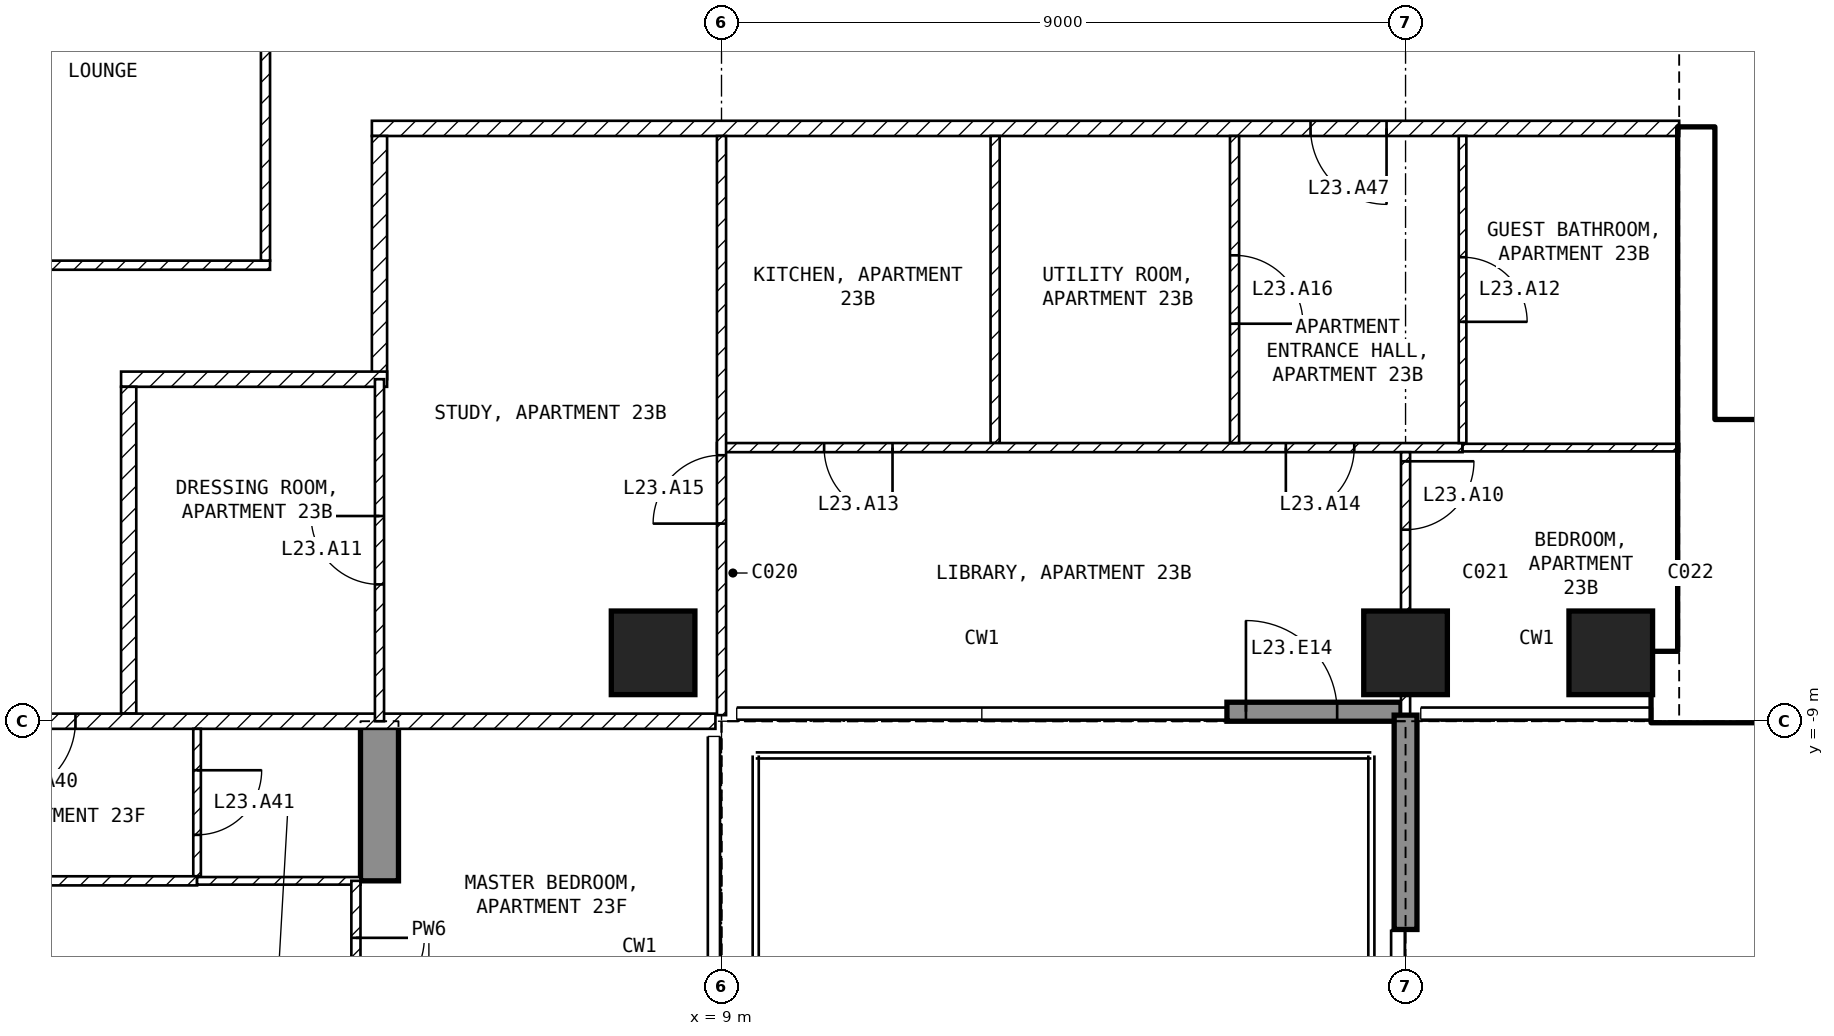
"""IFC4 building model, lengths in metres.
Left out: names, types, materials, properties, quantities, classifications, styles, units other than length and angle.
Written with IfcOpenShell. Run it as: python <this file> out.ifc"""

import sys

from ifc_helpers import new_model, si_unit, direction, frame, frame_2d, origin, origin_2d, place, context, subcontext, project, spatial, polyline, rectangle, outline, extrude, element, fill, save


model = new_model("IFC4")
c1 = context("Model", 3, precision=1e-05, world=origin(), true_north=direction((0.0, 1.0)))
c2 = subcontext(c1, "Body", "Model", "MODEL_VIEW")
j1 = project(units=[si_unit("LENGTHUNIT", "METRE"), si_unit("PLANEANGLEUNIT", "RADIAN")], contexts=[c1])
p1 = place(None, origin())
s1 = spatial("IfcSite", under=j1, at=p1, CompositionType="ELEMENT")
p2 = place(p1, origin())
s2 = spatial("IfcBuilding", under=s1, at=p2, CompositionType="ELEMENT")
p3 = place(p2, frame((0.0, 0.0, 102.4)))
s3 = spatial("IfcBuildingStorey", under=s2, at=p3, CompositionType="ELEMENT", Elevation=102.4)
for number, where, z_axis, x_axis in (
    (1, (8.1, -8.1, -0.25), (0.0, 0.0, 1.0), (1.0, 0.0, 0.0)),
    (2, (18.0, -8.1, -0.25), (0.0, 0.0, 1.0), (1.0, 0.0, 0.0)),
    (3, (20.7, -8.1, -0.25), (0.0, 0.0, 1.0), (1.0, 0.0, 0.0)),
):
    element("IfcColumn", number, at=place(p3, frame(where, z_axis=z_axis, x_axis=x_axis)), inside=s3, PredefinedType="COLUMN", context=c2, shape_type="SweptSolid", body=[
        extrude(rectangle(XDim=1.1, YDim=1.1, at=origin_2d()), origin(), (0.0, 0.0, 1.0), 3.5),
    ])
p4 = place(p3, frame((4.25, -20.15, -0.25), z_axis=(1.0, 0.0, 0.0), x_axis=(0.0, 1.0, 0.0)))
e4 = element("IfcWall", 4, at=p4, inside=s3, PredefinedType="SHEAR", context=c2, shape_type="SweptSolid", body=[
    extrude(outline(polyline([(0.0, 0.0), (6.65, 0.0), (6.65, 2.65), (9.05, 2.65), (9.05, 0.0), (11.15, 0.0), (11.15, 3.5), (0.0, 3.5), (0.0, 0.0)])), origin(), (0.0, 0.0, 1.0), 0.5),
])
p5 = place(p3, frame((15.65, -8.875, 0.0), z_axis=(0.0, 0.0, 1.0), x_axis=(1.0, 0.0, 0.0)))
e5 = element("IfcWall", 5, at=p5, inside=s3, PredefinedType="SOLIDWALL", context=c2, shape_type="SweptSolid", body=[
    extrude(rectangle(XDim=2.29, YDim=0.25, at=frame_2d((1.145, 0.0))), origin(), (0.0, 0.0, 1.0), 3.25),
])
p6 = place(p5, frame((0.25, 0.0, 0.0)))
e6 = element("IfcOpeningElement", 6, at=p6, cuts=e5, PredefinedType="OPENING", context=c2, shape_type="SweptSolid", body=[
    extrude(rectangle(XDim=1.2, YDim=2.4, at=frame_2d((0.6, 1.2))), frame((0.0, 0.135, 0.0), z_axis=(0.0, -1.0, 0.0), x_axis=(1.0, 0.0, 0.0)), (0.0, 0.0, 1.0), 0.27),
])
p7 = place(p3, frame((18.0, -8.92, 0.0), z_axis=(0.0, 0.0, 1.0), x_axis=(0.0, -1.0, 0.0)))
e7 = element("IfcWall", 7, at=p7, inside=s3, PredefinedType="SOLIDWALL", context=c2, shape_type="SweptSolid", body=[
    extrude(rectangle(XDim=2.82, YDim=0.3, at=frame_2d((1.41, 0.0))), origin(), (0.0, 0.0, 1.0), 3.25),
])
p8 = place(p3, frame((21.25, -8.55, 0.0), z_axis=(0.0, 0.0, 1.0), x_axis=(1.0, 0.0, 0.0)))
e8 = element("IfcWall", 8, at=p8, inside=s3, PredefinedType="SHEAR", context=c2, shape_type="SweptSolid", body=[
    extrude(rectangle(XDim=8.95, YDim=0.9, at=frame_2d((4.475, 0.0))), origin(), (0.0, 0.0, 1.0), 3.25),
])
p9 = place(p3, frame((21.825, -8.1, 0.0), z_axis=(0.0, 0.0, 1.0), x_axis=(0.0, 1.0, 0.0)))
e9 = element("IfcWall", 9, at=p9, inside=s3, PredefinedType="SHEAR", context=c2, shape_type="SweptSolid", body=[
    extrude(rectangle(XDim=6.9, YDim=0.45, at=frame_2d((3.45, 0.0))), origin(), (0.0, 0.0, 1.0), 3.25),
])
p10 = place(p3, frame((22.05, -5.15, 0.0), z_axis=(0.0, 0.0, 1.0), x_axis=(1.0, 0.0, 0.0)))
e10 = element("IfcWall", 10, at=p10, inside=s3, PredefinedType="SOLIDWALL", context=c2, shape_type="SweptSolid", body=[
    extrude(rectangle(XDim=6.3, YDim=0.2, at=frame_2d((3.15, 0.0))), origin(), (0.0, 0.0, 1.0), 3.25),
])
p11 = place(p10, frame((0.2, 0.0, 0.0)))
e11 = element("IfcOpeningElement", 11, at=p11, cuts=e10, PredefinedType="OPENING", context=c2, shape_type="SweptSolid", body=[
    extrude(rectangle(XDim=1.0, YDim=2.1, at=frame_2d((0.5, 1.05))), frame((0.0, 0.11, 0.0), z_axis=(0.0, -1.0, 0.0), x_axis=(1.0, 0.0, 0.0)), (0.0, 0.0, 1.0), 0.22),
])
p12 = place(p3, frame((-3.06, -3.0, 0.0), z_axis=(0.0, 0.0, 1.0), x_axis=(1.0, 0.0, 0.0)))
e12 = element("IfcWall", 12, at=p12, inside=s3, PredefinedType="PARTITIONING", context=c2, shape_type="SweptSolid", body=[
    extrude(rectangle(XDim=6.12, YDim=0.12, at=frame_2d((3.06, 0.0))), origin(), (0.0, 0.0, 1.0), 3.25),
])
p13 = place(p3, frame((3.0, -2.94, 0.0), z_axis=(0.0, 0.0, 1.0), x_axis=(0.0, 1.0, 0.0)))
e13 = element("IfcWall", 13, at=p13, inside=s3, PredefinedType="PARTITIONING", context=c2, shape_type="SweptSolid", body=[
    extrude(rectangle(XDim=5.88, YDim=0.12, at=frame_2d((2.94, 0.0))), origin(), (0.0, 0.0, 1.0), 3.25),
])
p14 = place(p3, frame((21.6, -1.2, 0.0), z_axis=(0.0, 0.0, 1.0), x_axis=(-1.0, 0.0, 0.0)))
e14 = element("IfcWall", 14, at=p14, inside=s3, PredefinedType="PARTITIONING", context=c2, shape_type="SweptSolid", body=[
    extrude(rectangle(XDim=17.2, YDim=0.2, at=frame_2d((8.6, 0.0))), origin(), (0.0, 0.0, 1.0), 3.25),
])
p15 = place(p14, frame((3.85, 0.0, 0.0)))
e15 = element("IfcOpeningElement", 15, at=p15, cuts=e14, PredefinedType="OPENING", context=c2, shape_type="SweptSolid", body=[
    extrude(rectangle(XDim=1.0, YDim=2.1, at=frame_2d((0.5, 1.05))), frame((0.0, 0.11, 0.0), z_axis=(0.0, -1.0, 0.0), x_axis=(1.0, 0.0, 0.0)), (0.0, 0.0, 1.0), 0.22),
])
p16 = place(p3, frame((4.5, -1.3, 0.0), z_axis=(0.0, 0.0, 1.0), x_axis=(0.0, -1.0, 0.0)))
e16 = element("IfcWall", 16, at=p16, inside=s3, PredefinedType="PARTITIONING", context=c2, shape_type="SweptSolid", body=[
    extrude(rectangle(XDim=3.2, YDim=0.2, at=frame_2d((1.6, 0.0))), origin(), (0.0, 0.0, 1.0), 3.25),
])
p17 = place(p3, frame((4.6, -4.5, 0.0), z_axis=(0.0, 0.0, 1.0), x_axis=(-1.0, 0.0, 0.0)))
e17 = element("IfcWall", 17, at=p17, inside=s3, PredefinedType="PARTITIONING", context=c2, shape_type="SweptSolid", body=[
    extrude(rectangle(XDim=3.5, YDim=0.2, at=frame_2d((1.75, 0.0))), origin(), (0.0, 0.0, 1.0), 3.25),
])
p18 = place(p3, frame((1.2, -4.6, 0.0), z_axis=(0.0, 0.0, 1.0), x_axis=(0.0, -1.0, 0.0)))
e18 = element("IfcWall", 18, at=p18, inside=s3, PredefinedType="PARTITIONING", context=c2, shape_type="SweptSolid", body=[
    extrude(rectangle(XDim=4.3, YDim=0.2, at=frame_2d((2.15, 0.0))), origin(), (0.0, 0.0, 1.0), 3.25),
])
p19 = place(p3, frame((8.92, -9.0, 0.0), z_axis=(0.0, 0.0, 1.0), x_axis=(-1.0, 0.0, 0.0)))
e19 = element("IfcWall", 19, at=p19, inside=s3, PredefinedType="PARTITIONING", context=c2, shape_type="SweptSolid", body=[
    extrude(rectangle(XDim=17.84, YDim=0.2, at=frame_2d((8.92, 0.0))), origin(), (0.0, 0.0, 1.0), 3.25),
])
p20 = place(p19, frame((8.42, 0.0, 0.0)))
e20 = element("IfcOpeningElement", 20, at=p20, cuts=e19, PredefinedType="OPENING", context=c2, shape_type="SweptSolid", body=[
    extrude(rectangle(XDim=1.0, YDim=2.1, at=frame_2d((0.5, 1.05))), frame((0.0, 0.11, 0.0), z_axis=(0.0, -1.0, 0.0), x_axis=(1.0, 0.0, 0.0)), (0.0, 0.0, 1.0), 0.22),
])
p21 = place(p3, frame((12.6, -1.3, 0.0), z_axis=(0.0, 0.0, 1.0), x_axis=(0.0, -1.0, 0.0)))
e21 = element("IfcWall", 21, at=p21, inside=s3, PredefinedType="PARTITIONING", context=c2, shape_type="SweptSolid", body=[
    extrude(rectangle(XDim=4.04, YDim=0.12, at=frame_2d((2.02, 0.0))), origin(), (0.0, 0.0, 1.0), 3.25),
])
p22 = place(p3, frame((18.75, -5.4, 0.0), z_axis=(0.0, 0.0, 1.0), x_axis=(-1.0, 0.0, 0.0)))
e22 = element("IfcWall", 22, at=p22, inside=s3, PredefinedType="PARTITIONING", context=c2, shape_type="SweptSolid", body=[
    extrude(rectangle(XDim=9.81, YDim=0.12, at=frame_2d((4.905, 0.0))), origin(), (0.0, 0.0, 1.0), 3.25),
])
p23 = place(p22, frame((7.5, 0.0, 0.0)))
e23 = element("IfcOpeningElement", 23, at=p23, cuts=e22, PredefinedType="OPENING", context=c2, shape_type="SweptSolid", body=[
    extrude(rectangle(XDim=0.9, YDim=2.1, at=frame_2d((0.45, 1.05))), frame((0.0, 0.07, 0.0), z_axis=(0.0, -1.0, 0.0), x_axis=(1.0, 0.0, 0.0)), (0.0, 0.0, 1.0), 0.14),
])
p24 = place(p22, frame((1.425, 0.0, 0.0)))
e24 = element("IfcOpeningElement", 24, at=p24, cuts=e22, PredefinedType="OPENING", context=c2, shape_type="SweptSolid", body=[
    extrude(rectangle(XDim=0.9, YDim=2.1, at=frame_2d((0.45, 1.05))), frame((0.0, 0.07, 0.0), z_axis=(0.0, -1.0, 0.0), x_axis=(1.0, 0.0, 0.0)), (0.0, 0.0, 1.0), 0.14),
])
p25 = place(p3, frame((9.0, -8.92, 0.0), z_axis=(0.0, 0.0, 1.0), x_axis=(0.0, 1.0, 0.0)))
e25 = element("IfcWall", 25, at=p25, inside=s3, PredefinedType="PARTITIONING", context=c2, shape_type="SweptSolid", body=[
    extrude(rectangle(XDim=7.62, YDim=0.12, at=frame_2d((3.81, 0.0))), origin(), (0.0, 0.0, 1.0), 3.25),
])
p26 = place(p25, frame((2.52, 0.0, 0.0)))
e26 = element("IfcOpeningElement", 26, at=p26, cuts=e25, PredefinedType="OPENING", context=c2, shape_type="SweptSolid", body=[
    extrude(rectangle(XDim=0.9, YDim=2.1, at=frame_2d((0.45, 1.05))), frame((0.0, 0.07, 0.0), z_axis=(0.0, -1.0, 0.0), x_axis=(1.0, 0.0, 0.0)), (0.0, 0.0, 1.0), 0.14),
])
p27 = place(p3, frame((15.75, -1.3, 0.0), z_axis=(0.0, 0.0, 1.0), x_axis=(0.0, -1.0, 0.0)))
e27 = element("IfcWall", 27, at=p27, inside=s3, PredefinedType="PARTITIONING", context=c2, shape_type="SweptSolid", body=[
    extrude(rectangle(XDim=4.04, YDim=0.12, at=frame_2d((2.02, 0.0))), origin(), (0.0, 0.0, 1.0), 3.25),
])
p28 = place(p27, frame((1.57, 0.0, 0.0)))
e28 = element("IfcOpeningElement", 28, at=p28, cuts=e27, PredefinedType="OPENING", context=c2, shape_type="SweptSolid", body=[
    extrude(rectangle(XDim=0.9, YDim=2.1, at=frame_2d((0.45, 1.05))), frame((0.0, 0.07, 0.0), z_axis=(0.0, -1.0, 0.0), x_axis=(1.0, 0.0, 0.0)), (0.0, 0.0, 1.0), 0.14),
])
p29 = place(p3, frame((18.75, -1.3, 0.0), z_axis=(0.0, 0.0, 1.0), x_axis=(0.0, -1.0, 0.0)))
e29 = element("IfcWall", 29, at=p29, inside=s3, PredefinedType="PARTITIONING", context=c2, shape_type="SweptSolid", body=[
    extrude(rectangle(XDim=4.04, YDim=0.1, at=frame_2d((2.02, 0.0))), origin(), (0.0, 0.0, 1.0), 3.25),
])
p30 = place(p29, frame((1.595, 0.0, 0.0)))
e30 = element("IfcOpeningElement", 30, at=p30, cuts=e29, PredefinedType="OPENING", context=c2, shape_type="SweptSolid", body=[
    extrude(rectangle(XDim=0.85, YDim=2.1, at=frame_2d((0.425, 1.05))), frame((0.0, 0.06, 0.0), z_axis=(0.0, -1.0, 0.0), x_axis=(1.0, 0.0, 0.0)), (0.0, 0.0, 1.0), 0.12),
])
p31 = place(p3, frame((21.6, -5.4, 0.0), z_axis=(0.0, 0.0, 1.0), x_axis=(-1.0, 0.0, 0.0)))
e31 = element("IfcWall", 31, at=p31, inside=s3, PredefinedType="PARTITIONING", context=c2, shape_type="SweptSolid", body=[
    extrude(rectangle(XDim=2.85, YDim=0.1, at=frame_2d((1.425, 0.0))), origin(), (0.0, 0.0, 1.0), 3.25),
])
p32 = place(p3, frame((18.0, -5.46, 0.0), z_axis=(0.0, 0.0, 1.0), x_axis=(0.0, -1.0, 0.0)))
e32 = element("IfcWall", 32, at=p32, inside=s3, PredefinedType="PARTITIONING", context=c2, shape_type="SweptSolid", body=[
    extrude(rectangle(XDim=3.46, YDim=0.12, at=frame_2d((1.73, 0.0))), origin(), (0.0, 0.0, 1.0), 2.414),
])
p33 = place(p32, frame((0.12, 0.0, 0.0)))
e33 = element("IfcOpeningElement", 33, at=p33, cuts=e32, PredefinedType="OPENING", context=c2, shape_type="SweptSolid", body=[
    extrude(rectangle(XDim=0.9, YDim=2.1, at=frame_2d((0.45, 1.05))), frame((0.0, 0.07, 0.0), z_axis=(0.0, -1.0, 0.0), x_axis=(1.0, 0.0, 0.0)), (0.0, 0.0, 1.0), 0.14),
])
p34 = place(p3, frame((4.5, -9.0, 0.0), z_axis=(0.0, 0.0, 1.0), x_axis=(0.0, 1.0, 0.0)))
e34 = element("IfcWall", 34, at=p34, inside=s3, PredefinedType="PARTITIONING", context=c2, shape_type="SweptSolid", body=[
    extrude(rectangle(XDim=4.5, YDim=0.12, at=frame_2d((2.25, 0.0))), origin(), (0.0, 0.0, 1.0), 3.25),
])
p35 = place(p34, frame((1.8, 0.0, 0.0)))
e35 = element("IfcOpeningElement", 35, at=p35, cuts=e34, PredefinedType="OPENING", context=c2, shape_type="SweptSolid", body=[
    extrude(rectangle(XDim=0.9, YDim=2.1, at=frame_2d((0.45, 1.05))), frame((0.0, 0.07, 0.0), z_axis=(0.0, -1.0, 0.0), x_axis=(1.0, 0.0, 0.0)), (0.0, 0.0, 1.0), 0.14),
])
p36 = place(p3, frame((2.1, -9.1, 0.0), z_axis=(0.0, 0.0, 1.0), x_axis=(0.0, -1.0, 0.0)))
e36 = element("IfcWall", 36, at=p36, inside=s3, PredefinedType="PARTITIONING", context=c2, shape_type="SweptSolid", body=[
    extrude(rectangle(XDim=1.94, YDim=0.1, at=frame_2d((0.97, 0.0))), origin(), (0.0, 0.0, 1.0), 3.25),
])
p37 = place(p36, frame((0.545, 0.0, 0.0)))
e37 = element("IfcOpeningElement", 37, at=p37, cuts=e36, PredefinedType="OPENING", context=c2, shape_type="SweptSolid", body=[
    extrude(rectangle(XDim=0.85, YDim=2.1, at=frame_2d((0.425, 1.05))), frame((0.0, 0.06, 0.0), z_axis=(0.0, -1.0, 0.0), x_axis=(1.0, 0.0, 0.0)), (0.0, 0.0, 1.0), 0.12),
])
p38 = place(p3, frame((2.1, -11.1, 0.0), z_axis=(0.0, 0.0, 1.0), x_axis=(-1.0, 0.0, 0.0)))
e38 = element("IfcWall", 38, at=p38, inside=s3, PredefinedType="PARTITIONING", context=c2, shape_type="SweptSolid", body=[
    extrude(rectangle(XDim=6.35, YDim=0.12, at=frame_2d((3.175, 0.0))), origin(), (0.0, 0.0, 1.0), 3.25),
])
p39 = place(p38, frame((2.725, 0.0, 0.0)))
e39 = element("IfcOpeningElement", 39, at=p39, cuts=e38, PredefinedType="OPENING", context=c2, shape_type="SweptSolid", body=[
    extrude(rectangle(XDim=0.9, YDim=2.1, at=frame_2d((0.45, 1.05))), frame((0.0, 0.07, 0.0), z_axis=(0.0, -1.0, 0.0), x_axis=(1.0, 0.0, 0.0)), (0.0, 0.0, 1.0), 0.14),
])
p40 = place(p3, frame((4.25, -11.1, 0.0), z_axis=(0.0, 0.0, 1.0), x_axis=(-1.0, 0.0, 0.0)))
e40 = element("IfcWall", 40, at=p40, inside=s3, PredefinedType="PARTITIONING", context=c2, shape_type="SweptSolid", body=[
    extrude(rectangle(XDim=2.15, YDim=0.1, at=frame_2d((1.075, 0.0))), origin(), (0.0, 0.0, 1.0), 3.25),
])
p41 = place(p3, frame((4.19, -11.1, 0.0), z_axis=(0.0, 0.0, 1.0), x_axis=(0.0, -1.0, 0.0)))
e41 = element("IfcWall", 41, at=p41, inside=s3, PredefinedType="PARTITIONING", context=c2, shape_type="SweptSolid", body=[
    extrude(rectangle(XDim=2.4, YDim=0.12, at=frame_2d((1.2, 0.0))), origin(), (0.0, 0.0, 1.0), 2.4),
])
p42 = place(p41, frame((0.75, 0.0, 0.0)))
e42 = element("IfcOpeningElement", 42, at=p42, cuts=e41, PredefinedType="OPENING", context=c2, shape_type="SweptSolid", body=[
    extrude(rectangle(XDim=0.9, YDim=2.1, at=frame_2d((0.45, 1.05))), frame((0.0, 0.07, 0.0), z_axis=(0.0, -1.0, 0.0), x_axis=(1.0, 0.0, 0.0)), (0.0, 0.0, 1.0), 0.14),
])
p43 = place(p6, origin())
e43 = element("IfcDoor", 43, at=p43, inside=s3, OperationType="SINGLE_SWING_LEFT", PredefinedType="DOOR", context=c2, shape_type="SweptSolid", body=[
    extrude(rectangle(XDim=1.2, YDim=2.4, at=frame_2d((0.6, 1.2))), frame((0.0, 0.025, 0.0), z_axis=(0.0, -1.0, 0.0), x_axis=(1.0, 0.0, 0.0)), (0.0, 0.0, 1.0), 0.05),
])
fill(e6, e43)
p44 = place(p11, origin())
e44 = element("IfcDoor", 44, at=p44, inside=s3, OperationType="SINGLE_SWING_LEFT", PredefinedType="DOOR", context=c2, shape_type="SweptSolid", body=[
    extrude(rectangle(XDim=1.0, YDim=2.1, at=frame_2d((0.5, 1.05))), frame((0.0, 0.025, 0.0), z_axis=(0.0, -1.0, 0.0), x_axis=(1.0, 0.0, 0.0)), (0.0, 0.0, 1.0), 0.05),
])
fill(e11, e44)
p45 = place(p33, origin())
e45 = element("IfcDoor", 45, at=p45, inside=s3, OperationType="SINGLE_SWING_LEFT", PredefinedType="DOOR", context=c2, shape_type="SweptSolid", body=[
    extrude(rectangle(XDim=0.9, YDim=2.1, at=frame_2d((0.45, 1.05))), frame((0.0, 0.025, 0.0), z_axis=(0.0, -1.0, 0.0), x_axis=(1.0, 0.0, 0.0)), (0.0, 0.0, 1.0), 0.05),
])
fill(e33, e45)
p46 = place(p35, origin())
e46 = element("IfcDoor", 46, at=p46, inside=s3, OperationType="SINGLE_SWING_RIGHT", PredefinedType="DOOR", context=c2, shape_type="SweptSolid", body=[
    extrude(rectangle(XDim=0.9, YDim=2.1, at=frame_2d((0.45, 1.05))), frame((0.0, 0.025, 0.0), z_axis=(0.0, -1.0, 0.0), x_axis=(1.0, 0.0, 0.0)), (0.0, 0.0, 1.0), 0.05),
])
fill(e35, e46)
p47 = place(p30, origin())
e47 = element("IfcDoor", 47, at=p47, inside=s3, OperationType="SINGLE_SWING_RIGHT", PredefinedType="DOOR", context=c2, shape_type="SweptSolid", body=[
    extrude(rectangle(XDim=0.85, YDim=2.1, at=frame_2d((0.425, 1.05))), frame((0.0, 0.025, 0.0), z_axis=(0.0, -1.0, 0.0), x_axis=(1.0, 0.0, 0.0)), (0.0, 0.0, 1.0), 0.05),
])
fill(e30, e47)
p48 = place(p23, origin())
e48 = element("IfcDoor", 48, at=p48, inside=s3, OperationType="SINGLE_SWING_LEFT", PredefinedType="DOOR", context=c2, shape_type="SweptSolid", body=[
    extrude(rectangle(XDim=0.9, YDim=2.1, at=frame_2d((0.45, 1.05))), frame((0.0, 0.025, 0.0), z_axis=(0.0, -1.0, 0.0), x_axis=(1.0, 0.0, 0.0)), (0.0, 0.0, 1.0), 0.05),
])
fill(e23, e48)
p49 = place(p24, origin())
e49 = element("IfcDoor", 49, at=p49, inside=s3, OperationType="SINGLE_SWING_RIGHT", PredefinedType="DOOR", context=c2, shape_type="SweptSolid", body=[
    extrude(rectangle(XDim=0.9, YDim=2.1, at=frame_2d((0.45, 1.05))), frame((0.0, 0.025, 0.0), z_axis=(0.0, -1.0, 0.0), x_axis=(1.0, 0.0, 0.0)), (0.0, 0.0, 1.0), 0.05),
])
fill(e24, e49)
p50 = place(p26, origin())
e50 = element("IfcDoor", 50, at=p50, inside=s3, OperationType="SINGLE_SWING_LEFT", PredefinedType="DOOR", context=c2, shape_type="SweptSolid", body=[
    extrude(rectangle(XDim=0.9, YDim=2.1, at=frame_2d((0.45, 1.05))), frame((0.0, 0.025, 0.0), z_axis=(0.0, -1.0, 0.0), x_axis=(1.0, 0.0, 0.0)), (0.0, 0.0, 1.0), 0.05),
])
fill(e26, e50)
p51 = place(p28, origin())
e51 = element("IfcDoor", 51, at=p51, inside=s3, OperationType="SINGLE_SWING_RIGHT", PredefinedType="DOOR", context=c2, shape_type="SweptSolid", body=[
    extrude(rectangle(XDim=0.9, YDim=2.1, at=frame_2d((0.45, 1.05))), frame((0.0, 0.025, 0.0), z_axis=(0.0, -1.0, 0.0), x_axis=(1.0, 0.0, 0.0)), (0.0, 0.0, 1.0), 0.05),
])
fill(e28, e51)
p52 = place(p20, origin())
e52 = element("IfcDoor", 52, at=p52, inside=s3, OperationType="SINGLE_SWING_RIGHT", PredefinedType="DOOR", context=c2, shape_type="SweptSolid", body=[
    extrude(rectangle(XDim=1.0, YDim=2.1, at=frame_2d((0.5, 1.05))), frame((0.0, 0.025, 0.0), z_axis=(0.0, -1.0, 0.0), x_axis=(1.0, 0.0, 0.0)), (0.0, 0.0, 1.0), 0.05),
])
fill(e20, e52)
p53 = place(p37, origin())
e53 = element("IfcDoor", 53, at=p53, inside=s3, OperationType="SINGLE_SWING_LEFT", PredefinedType="DOOR", context=c2, shape_type="SweptSolid", body=[
    extrude(rectangle(XDim=0.85, YDim=2.1, at=frame_2d((0.425, 1.05))), frame((0.0, 0.025, 0.0), z_axis=(0.0, -1.0, 0.0), x_axis=(1.0, 0.0, 0.0)), (0.0, 0.0, 1.0), 0.05),
])
fill(e37, e53)
p54 = place(p15, origin())
e54 = element("IfcDoor", 54, at=p54, inside=s3, OperationType="SINGLE_SWING_LEFT", PredefinedType="DOOR", context=c2, shape_type="SweptSolid", body=[
    extrude(rectangle(XDim=1.0, YDim=2.1, at=frame_2d((0.5, 1.05))), frame((0.0, 0.025, 0.0), z_axis=(0.0, -1.0, 0.0), x_axis=(1.0, 0.0, 0.0)), (0.0, 0.0, 1.0), 0.05),
])
fill(e15, e54)
p55 = place(p42, origin())
e55 = element("IfcDoor", 55, at=p55, inside=s3, OperationType="SINGLE_SWING_LEFT", PredefinedType="DOOR", context=c2, shape_type="SweptSolid", body=[
    extrude(rectangle(XDim=0.9, YDim=2.1, at=frame_2d((0.45, 1.05))), frame((0.0, 0.025, 0.0), z_axis=(0.0, -1.0, 0.0), x_axis=(1.0, 0.0, 0.0)), (0.0, 0.0, 1.0), 0.05),
])
fill(e42, e55)
save(model, sys.argv[1])
